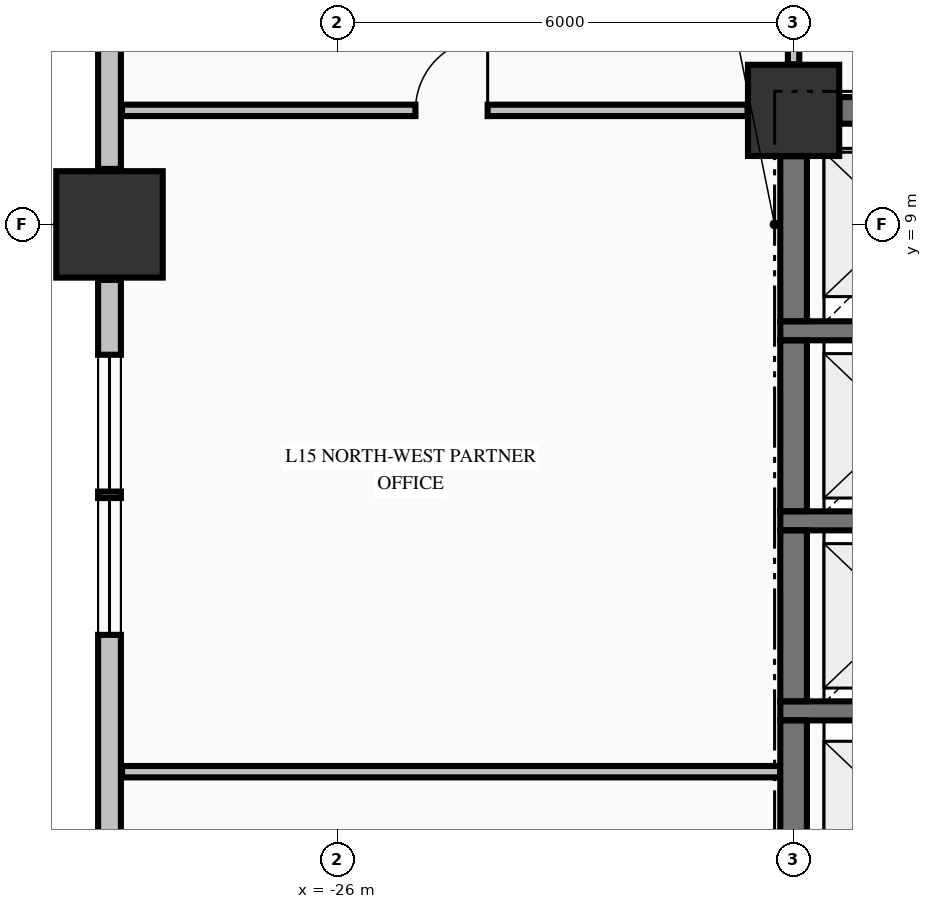
"""IFC4 building model, lengths in metres.
Left out: names, types, materials, properties, quantities, classifications, styles, units other than length and angle.
Written with IfcOpenShell. Run it as: python <this file> out.ifc"""

import sys

from ifc_helpers import new_model, si_unit, direction, frame, frame_2d, origin, origin_2d, place, context, subcontext, project, spatial, rectangle, extrude, element, fill, save


model = new_model("IFC4")
c1 = context("Model", 3, precision=1e-05, world=origin(), true_north=direction((0.0, 1.0)))
c2 = subcontext(c1, "Body", "Model", "MODEL_VIEW")
j1 = project(units=[si_unit("LENGTHUNIT", "METRE"), si_unit("PLANEANGLEUNIT", "RADIAN")], contexts=[c1])
p1 = place(None, origin())
s1 = spatial("IfcSite", under=j1, at=p1, CompositionType="ELEMENT")
p2 = place(p1, origin())
s2 = spatial("IfcBuilding", under=s1, at=p2, CompositionType="ELEMENT")
p3 = place(p2, frame((0.0, 0.0, 64.33)))
s3 = spatial("IfcBuildingStorey", under=s2, at=p3, CompositionType="ELEMENT", Elevation=64.33)
p4 = place(p3, frame((-29.0, 9.0, -0.25), z_axis=(0.0, 0.0, 1.0), x_axis=(1.0, 0.0, 0.0)))
e1 = element("IfcColumn", 1, at=p4, inside=s3, PredefinedType="COLUMN", context=c2, shape_type="SweptSolid", body=[
    extrude(rectangle(XDim=1.4, YDim=1.4, at=origin_2d()), origin(), (0.0, 0.0, 1.0), 3.57),
])
p5 = place(p3, frame((-20.0, 10.5, -0.25), z_axis=(0.0, 0.0, 1.0), x_axis=(1.0, 0.0, 0.0)))
e2 = element("IfcColumn", 2, at=p5, inside=s3, PredefinedType="COLUMN", context=c2, shape_type="SweptSolid", body=[
    extrude(rectangle(XDim=1.2, YDim=1.2, at=origin_2d()), origin(), (0.0, 0.0, 1.0), 3.57),
])
p6 = place(p3, frame((-29.0, 8.27, 0.0), z_axis=(0.0, 0.0, 1.0), x_axis=(0.0, -1.0, 0.0)))
e3 = element("IfcWall", 3, at=p6, inside=s3, PredefinedType="STANDARD", context=c2, shape_type="SweptSolid", body=[
    extrude(rectangle(XDim=7.54, YDim=0.3, at=frame_2d((3.77, 0.0))), origin(), (0.0, 0.0, 1.0), 2.712),
])
p7 = place(p6, frame((0.985, 0.0, 0.78)))
e4 = element("IfcOpeningElement", 4, at=p7, cuts=e3, PredefinedType="OPENING", context=c2, shape_type="SweptSolid", body=[
    extrude(rectangle(XDim=1.8, YDim=1.72, at=frame_2d((0.9, 0.86))), frame((0.0, 0.16, 0.0), z_axis=(0.0, -1.0, 0.0), x_axis=(1.0, 0.0, 0.0)), (0.0, 0.0, 1.0), 0.32),
])
p8 = place(p6, frame((2.87, 0.0, 0.78)))
e5 = element("IfcOpeningElement", 5, at=p8, cuts=e3, PredefinedType="OPENING", context=c2, shape_type="SweptSolid", body=[
    extrude(rectangle(XDim=1.8, YDim=1.72, at=frame_2d((0.9, 0.86))), frame((0.0, 0.16, 0.0), z_axis=(0.0, -1.0, 0.0), x_axis=(1.0, 0.0, 0.0)), (0.0, 0.0, 1.0), 0.32),
])
p9 = place(p3, frame((-29.0, 22.27, 0.0), z_axis=(0.0, 0.0, 1.0), x_axis=(0.0, -1.0, 0.0)))
e6 = element("IfcWall", 6, at=p9, inside=s3, PredefinedType="STANDARD", context=c2, shape_type="SweptSolid", body=[
    extrude(rectangle(XDim=12.54, YDim=0.3, at=frame_2d((6.27, 0.0))), origin(), (0.0, 0.0, 1.0), 2.712),
])
for number, where, z_axis, x_axis in (
    (7, (-20.175, 2.6, 0.0), (0.0, 0.0, 1.0), (1.0, 0.0, 0.0)),
    (8, (-20.175, 5.1, 0.0), (0.0, 0.0, 1.0), (1.0, 0.0, 0.0)),
    (9, (-20.175, 7.6, 0.0), (0.0, 0.0, 1.0), (1.0, 0.0, 0.0)),
):
    element("IfcWall", number, at=place(p3, frame(where, z_axis=z_axis, x_axis=x_axis)), inside=s3, PredefinedType="SOLIDWALL", context=c2, shape_type="SweptSolid", body=[
        extrude(rectangle(XDim=3.1, YDim=0.25, at=frame_2d((1.55, 0.0))), origin(), (0.0, 0.0, 1.0), 3.32),
    ])
p10 = place(p3, frame((-19.396, 10.5, 0.0), z_axis=(0.0, 0.0, 1.0), x_axis=(1.0, 0.0, 0.0)))
e10 = element("IfcWall", 10, at=p10, inside=s3, PredefinedType="SHEAR", context=c2, shape_type="SweptSolid", body=[
    extrude(rectangle(XDim=4.696, YDim=0.35, at=frame_2d((2.348, 0.0))), origin(), (0.0, 0.0, 1.0), 3.32),
])
p11 = place(p10, frame((2.796, 0.0, 0.0)))
e11 = element("IfcOpeningElement", 11, at=p11, cuts=e10, PredefinedType="OPENING", context=c2, shape_type="SweptSolid", body=[
    extrude(rectangle(XDim=1.2, YDim=2.15, at=frame_2d((0.6, 1.075))), frame((0.0, 0.185, 0.0), z_axis=(0.0, -1.0, 0.0), x_axis=(1.0, 0.0, 0.0)), (0.0, 0.0, 1.0), 0.37),
])
p12 = place(p3, frame((-28.835, 1.8, 0.0), z_axis=(0.0, 0.0, 1.0), x_axis=(1.0, 0.0, 0.0)))
e12 = element("IfcWall", 12, at=p12, inside=s3, PredefinedType="PARTITIONING", context=c2, shape_type="SweptSolid", body=[
    extrude(rectangle(XDim=8.657, YDim=0.15, at=frame_2d((4.329, 0.0))), origin(), (0.0, 0.0, 1.0), 3.32),
])
p13 = place(p3, frame((-28.835, 10.5, 0.0), z_axis=(0.0, 0.0, 1.0), x_axis=(1.0, 0.0, 0.0)))
e13 = element("IfcWall", 13, at=p13, inside=s3, PredefinedType="PARTITIONING", context=c2, shape_type="SweptSolid", body=[
    extrude(rectangle(XDim=8.229, YDim=0.15, at=frame_2d((4.115, 0.0))), origin(), (0.0, 0.0, 1.0), 3.32),
])
p14 = place(p13, frame((3.86, 0.0, 0.0)))
e14 = element("IfcOpeningElement", 14, at=p14, cuts=e13, PredefinedType="OPENING", context=c2, shape_type="SweptSolid", body=[
    extrude(rectangle(XDim=0.95, YDim=2.15, at=frame_2d((0.475, 1.075))), frame((0.0, 0.085, 0.0), z_axis=(0.0, -1.0, 0.0), x_axis=(1.0, 0.0, 0.0)), (0.0, 0.0, 1.0), 0.17),
])
p15 = place(p3, frame((-20.0, 0.604, 0.0), z_axis=(0.0, 0.0, 1.0), x_axis=(0.0, 1.0, 0.0)))
e15 = element("IfcWall", 15, at=p15, inside=s3, PredefinedType="SHEAR", context=c2, shape_type="SweptSolid", body=[
    extrude(rectangle(XDim=1.869, YDim=0.35, at=frame_2d((0.935, 0.0))), origin(), (0.0, 0.0, 1.0), 3.32),
])
for number, where, z_axis, x_axis in (
    (16, (-20.0, 2.727, 0.0), (0.0, 0.0, 1.0), (0.0, 1.0, 0.0)),
    (17, (-20.0, 5.227, 0.0), (0.0, 0.0, 1.0), (0.0, 1.0, 0.0)),
):
    element("IfcWall", number, at=place(p3, frame(where, z_axis=z_axis, x_axis=x_axis)), inside=s3, PredefinedType="SHEAR", context=c2, shape_type="SweptSolid", body=[
        extrude(rectangle(XDim=2.246, YDim=0.35, at=frame_2d((1.123, 0.0))), origin(), (0.0, 0.0, 1.0), 3.32),
    ])
p16 = place(p3, frame((-20.0, 7.727, 0.0), z_axis=(0.0, 0.0, 1.0), x_axis=(0.0, 1.0, 0.0)))
e18 = element("IfcWall", 18, at=p16, inside=s3, PredefinedType="SHEAR", context=c2, shape_type="SweptSolid", body=[
    extrude(rectangle(XDim=2.169, YDim=0.35, at=frame_2d((1.084, 0.0))), origin(), (0.0, 0.0, 1.0), 3.32),
])
p17 = place(p3, frame((-20.0, 11.106, 0.0), z_axis=(0.0, 0.0, 1.0), x_axis=(0.0, 1.0, 0.0)))
e19 = element("IfcWall", 19, at=p17, inside=s3, PredefinedType="PARTITIONING", context=c2, shape_type="SweptSolid", body=[
    extrude(rectangle(XDim=2.166, YDim=0.15, at=frame_2d((1.083, 0.0))), origin(), (0.0, 0.0, 1.0), 2.66),
])
p18 = place(p17, frame((0.349, 0.0, 0.0)))
e20 = element("IfcOpeningElement", 20, at=p18, cuts=e19, PredefinedType="OPENING", context=c2, shape_type="SweptSolid", body=[
    extrude(rectangle(XDim=0.95, YDim=2.15, at=frame_2d((0.475, 1.075))), frame((0.0, 0.085, 0.0), z_axis=(0.0, -1.0, 0.0), x_axis=(1.0, 0.0, 0.0)), (0.0, 0.0, 1.0), 0.17),
])
p19 = place(p7, origin())
e21 = element("IfcWindow", 21, at=p19, inside=s3, PartitioningType="SINGLE_PANEL", PredefinedType="WINDOW", context=c2, shape_type="SweptSolid", body=[
    extrude(rectangle(XDim=1.8, YDim=1.72, at=frame_2d((0.9, 0.86))), frame((0.0, 0.03, 0.0), z_axis=(0.0, -1.0, 0.0), x_axis=(1.0, 0.0, 0.0)), (0.0, 0.0, 1.0), 0.06),
])
fill(e4, e21)
p20 = place(p8, origin())
e22 = element("IfcWindow", 22, at=p20, inside=s3, PartitioningType="SINGLE_PANEL", PredefinedType="WINDOW", context=c2, shape_type="SweptSolid", body=[
    extrude(rectangle(XDim=1.8, YDim=1.72, at=frame_2d((0.9, 0.86))), frame((0.0, 0.03, 0.0), z_axis=(0.0, -1.0, 0.0), x_axis=(1.0, 0.0, 0.0)), (0.0, 0.0, 1.0), 0.06),
])
fill(e5, e22)
p21 = place(p14, origin())
e23 = element("IfcDoor", 23, at=p21, inside=s3, OperationType="SINGLE_SWING_RIGHT", PredefinedType="DOOR", context=c2, shape_type="SweptSolid", body=[
    extrude(rectangle(XDim=0.95, YDim=2.15, at=frame_2d((0.475, 1.075))), frame((0.0, 0.025, 0.0), z_axis=(0.0, -1.0, 0.0), x_axis=(1.0, 0.0, 0.0)), (0.0, 0.0, 1.0), 0.05),
])
fill(e14, e23)
save(model, sys.argv[1])
